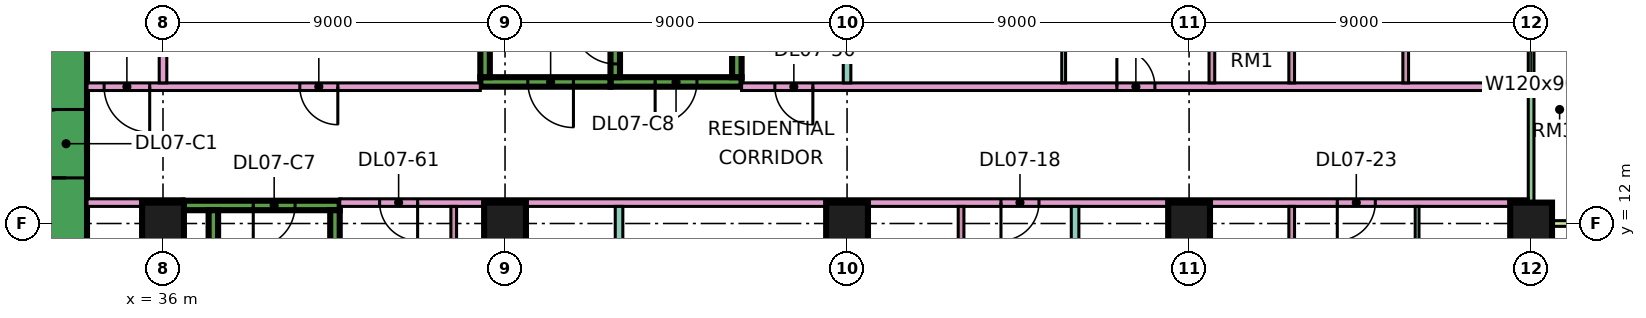
"""IFC4 building model, lengths in metres.
Left out: names, types, materials, properties, quantities, classifications, styles, units other than length and angle.
Written with IfcOpenShell. Run it as: python <this file> out.ifc"""

import sys

from ifc_helpers import new_model, si_unit, direction, frame, frame_2d, origin, origin_2d, place, context, subcontext, project, spatial, rectangle, extrude, element, fill, save


model = new_model("IFC4")
c1 = context("Model", 3, precision=1e-05, world=origin(), true_north=direction((0.0, 1.0)))
c2 = subcontext(c1, "Body", "Model", "MODEL_VIEW")
j1 = project(units=[si_unit("LENGTHUNIT", "METRE"), si_unit("PLANEANGLEUNIT", "RADIAN")], contexts=[c1])
p1 = place(None, origin())
s1 = spatial("IfcSite", under=j1, at=p1, CompositionType="ELEMENT")
p2 = place(p1, origin())
s2 = spatial("IfcBuilding", under=s1, at=p2, CompositionType="ELEMENT")
p3 = place(p2, frame((0.0, 0.0, 41.4)))
s3 = spatial("IfcBuildingStorey", under=s2, at=p3, CompositionType="ELEMENT", Elevation=41.4)
for number, where, z_axis, x_axis in (
    (1, (36.0, 12.0, 0.0), (0.0, 0.0, 1.0), (1.0, 0.0, 0.0)),
    (2, (45.0, 12.0, 0.0), (0.0, 0.0, 1.0), (1.0, 0.0, 0.0)),
    (3, (54.0, 12.0, 0.0), (0.0, 0.0, 1.0), (1.0, 0.0, 0.0)),
    (4, (63.0, 12.0, 0.0), (0.0, 0.0, 1.0), (1.0, 0.0, 0.0)),
    (5, (72.0, 12.0, 0.0), (0.0, 0.0, 1.0), (1.0, 0.0, 0.0)),
):
    element("IfcColumn", number, at=place(p3, frame(where, z_axis=z_axis, x_axis=x_axis)), inside=s3, PredefinedType="COLUMN", context=c2, shape_type="SweptSolid", body=[
        extrude(rectangle(XDim=1.1, YDim=1.1, at=origin_2d()), origin(), (0.0, 0.0, 1.0), 3.75),
    ])
p4 = place(p3, frame((33.45, 8.1, 0.0), z_axis=(0.0, 0.0, 1.0), x_axis=(0.0, 1.0, 0.0)))
e6 = element("IfcWall", 6, at=p4, inside=s3, PredefinedType="SHEAR", context=c2, shape_type="SweptSolid", body=[
    extrude(rectangle(XDim=10.8, YDim=1.1, at=frame_2d((5.4, 0.0))), origin(), (0.0, 0.0, 1.0), 3.75),
])
p5 = place(p4, frame((5.1, 0.0, 0.0)))
e7 = element("IfcOpeningElement", 7, at=p5, cuts=e6, PredefinedType="OPENING", context=c2, shape_type="SweptSolid", body=[
    extrude(rectangle(XDim=1.8, YDim=2.4, at=frame_2d((0.9, 1.2))), frame((0.0, 0.56, 0.0), z_axis=(0.0, -1.0, 0.0), x_axis=(1.0, 0.0, 0.0)), (0.0, 0.0, 1.0), 1.12),
])
p6 = place(p3, frame((36.55, 12.475, 0.0), z_axis=(0.0, 0.0, 1.0), x_axis=(1.0, 0.0, 0.0)))
e8 = element("IfcWall", 8, at=p6, inside=s3, PredefinedType="SHEAR", context=c2, shape_type="SweptSolid", body=[
    extrude(rectangle(XDim=4.1, YDim=0.25, at=frame_2d((2.05, 0.0))), origin(), (0.0, 0.0, 1.0), 3.75),
])
p7 = place(p6, frame((1.825, 0.0, 0.0)))
e9 = element("IfcOpeningElement", 9, at=p7, cuts=e8, PredefinedType="OPENING", context=c2, shape_type="SweptSolid", body=[
    extrude(rectangle(XDim=1.1, YDim=2.2, at=frame_2d((0.55, 1.1))), frame((0.0, 0.135, 0.0), z_axis=(0.0, -1.0, 0.0), x_axis=(1.0, 0.0, 0.0)), (0.0, 0.0, 1.0), 0.27),
])
for number, where, z_axis, x_axis in (
    (10, (37.325, 5.85, 0.0), (0.0, 0.0, 1.0), (0.0, 1.0, 0.0)),
    (11, (40.525, 5.85, 0.0), (0.0, 0.0, 1.0), (0.0, 1.0, 0.0)),
):
    element("IfcWall", number, at=place(p3, frame(where, z_axis=z_axis, x_axis=x_axis)), inside=s3, PredefinedType="SHEAR", context=c2, shape_type="SweptSolid", body=[
        extrude(rectangle(XDim=6.5, YDim=0.25, at=frame_2d((3.25, 0.0))), origin(), (0.0, 0.0, 1.0), 3.75),
    ])
p8 = place(p3, frame((47.775, 15.725, 0.0), z_axis=(0.0, 0.0, 1.0), x_axis=(1.0, 0.0, 0.0)))
e12 = element("IfcWall", 12, at=p8, inside=s3, PredefinedType="SHEAR", context=c2, shape_type="SweptSolid", body=[
    extrude(rectangle(XDim=3.45, YDim=0.25, at=frame_2d((1.725, 0.0))), origin(), (0.0, 0.0, 1.0), 3.75),
])
p9 = place(p8, frame((1.175, 0.0, 0.0)))
e13 = element("IfcOpeningElement", 13, at=p9, cuts=e12, PredefinedType="OPENING", context=c2, shape_type="SweptSolid", body=[
    extrude(rectangle(XDim=1.1, YDim=2.2, at=frame_2d((0.55, 1.1))), frame((0.0, 0.135, 0.0), z_axis=(0.0, -1.0, 0.0), x_axis=(1.0, 0.0, 0.0)), (0.0, 0.0, 1.0), 0.27),
])
p10 = place(p3, frame((47.9, 15.85, 0.0), z_axis=(0.0, 0.0, 1.0), x_axis=(0.0, 1.0, 0.0)))
e14 = element("IfcWall", 14, at=p10, inside=s3, PredefinedType="SHEAR", context=c2, shape_type="SweptSolid", body=[
    extrude(rectangle(XDim=6.5, YDim=0.25, at=frame_2d((3.25, 0.0))), origin(), (0.0, 0.0, 1.0), 3.75),
])
p11 = place(p10, frame((0.35, 0.0, 0.0)))
e15 = element("IfcOpeningElement", 15, at=p11, cuts=e14, PredefinedType="OPENING", context=c2, shape_type="SweptSolid", body=[
    extrude(rectangle(XDim=1.1, YDim=2.2, at=frame_2d((0.55, 1.1))), frame((0.0, 0.135, 0.0), z_axis=(0.0, -1.0, 0.0), x_axis=(1.0, 0.0, 0.0)), (0.0, 0.0, 1.0), 0.27),
])
p12 = place(p3, frame((51.1, 15.85, 0.0), z_axis=(0.0, 0.0, 1.0), x_axis=(0.0, 1.0, 0.0)))
e16 = element("IfcWall", 16, at=p12, inside=s3, PredefinedType="SHEAR", context=c2, shape_type="SweptSolid", body=[
    extrude(rectangle(XDim=6.5, YDim=0.25, at=frame_2d((3.25, 0.0))), origin(), (0.0, 0.0, 1.0), 3.75),
])
p13 = place(p3, frame((44.35, 15.725, 0.0), z_axis=(0.0, 0.0, 1.0), x_axis=(1.0, 0.0, 0.0)))
e17 = element("IfcWall", 17, at=p13, inside=s3, PredefinedType="SHEAR", context=c2, shape_type="SweptSolid", body=[
    extrude(rectangle(XDim=3.425, YDim=0.25, at=frame_2d((1.712, 0.0))), origin(), (0.0, 0.0, 1.0), 3.75),
])
p14 = place(p13, frame((1.25, 0.0, 0.0)))
e18 = element("IfcOpeningElement", 18, at=p14, cuts=e17, PredefinedType="OPENING", context=c2, shape_type="SweptSolid", body=[
    extrude(rectangle(XDim=1.2, YDim=2.2, at=frame_2d((0.6, 1.1))), frame((0.0, 0.135, 0.0), z_axis=(0.0, -1.0, 0.0), x_axis=(1.0, 0.0, 0.0)), (0.0, 0.0, 1.0), 0.27),
])
p15 = place(p3, frame((44.475, 15.85, 0.0), z_axis=(0.0, 0.0, 1.0), x_axis=(0.0, 1.0, 0.0)))
e19 = element("IfcWall", 19, at=p15, inside=s3, PredefinedType="SHEAR", context=c2, shape_type="SweptSolid", body=[
    extrude(rectangle(XDim=6.5, YDim=0.25, at=frame_2d((3.25, 0.0))), origin(), (0.0, 0.0, 1.0), 3.75),
])
p16 = place(p15, frame((1.75, 0.0, 0.0)))
e20 = element("IfcOpeningElement", 20, at=p16, cuts=e19, PredefinedType="OPENING", context=c2, shape_type="SweptSolid", body=[
    extrude(rectangle(XDim=1.1, YDim=2.2, at=frame_2d((0.55, 1.1))), frame((0.0, 0.135, 0.0), z_axis=(0.0, -1.0, 0.0), x_axis=(1.0, 0.0, 0.0)), (0.0, 0.0, 1.0), 0.27),
])
p17 = place(p15, frame((4.3, 0.0, 0.0)))
e21 = element("IfcOpeningElement", 21, at=p17, cuts=e19, PredefinedType="OPENING", context=c2, shape_type="SweptSolid", body=[
    extrude(rectangle(XDim=1.1, YDim=2.2, at=frame_2d((0.55, 1.1))), frame((0.0, 0.135, 0.0), z_axis=(0.0, -1.0, 0.0), x_axis=(1.0, 0.0, 0.0)), (0.0, 0.0, 1.0), 0.27),
])
p18 = place(p3, frame((72.0, 12.075, 0.0), z_axis=(0.0, 0.0, 1.0), x_axis=(0.0, 1.0, 0.0)))
e22 = element("IfcWall", 22, at=p18, inside=s3, PredefinedType="SOLIDWALL", context=c2, shape_type="SweptSolid", body=[
    extrude(rectangle(XDim=10.35, YDim=0.15, at=frame_2d((5.175, 0.0))), origin(), (0.0, 0.0, 1.0), 3.35),
])
p19 = place(p18, frame((4.575, 0.0, 1.7)))
e23 = element("IfcOpeningElement", 23, at=p19, cuts=e22, PredefinedType="OPENING", context=c2, shape_type="SweptSolid", body=[
    extrude(rectangle(XDim=1.2, YDim=0.9, at=frame_2d((0.6, 0.45))), frame((0.0, 0.085, 0.0), z_axis=(0.0, -1.0, 0.0), x_axis=(1.0, 0.0, 0.0)), (0.0, 0.0, 1.0), 0.17),
])
p20 = place(p18, frame((8.587, 0.0, 0.45)))
e24 = element("IfcOpeningElement", 24, at=p20, cuts=e22, PredefinedType="OPENING", context=c2, shape_type="SweptSolid", body=[
    extrude(rectangle(XDim=1.2, YDim=2.4, at=frame_2d((0.6, 1.2))), frame((0.0, 0.085, 0.0), z_axis=(0.0, -1.0, 0.0), x_axis=(1.0, 0.0, 0.0)), (0.0, 0.0, 1.0), 0.17),
])
p21 = place(p3, frame((73.5, 12.0, 0.0), z_axis=(0.0, 0.0, 1.0), x_axis=(-1.0, 0.0, 0.0)))
e25 = element("IfcWall", 25, at=p21, inside=s3, PredefinedType="SOLIDWALL", context=c2, shape_type="SweptSolid", body=[
    extrude(rectangle(XDim=1.5, YDim=0.15, at=frame_2d((0.75, 0.0))), origin(), (0.0, 0.0, 1.0), 3.35),
])
p22 = place(p3, frame((34.0, 12.55, 0.0), z_axis=(0.0, 0.0, 1.0), x_axis=(1.0, 0.0, 0.0)))
e26 = element("IfcWall", 26, at=p22, inside=s3, PredefinedType="PARTITIONING", context=c2, shape_type="SweptSolid", body=[
    extrude(rectangle(XDim=2.551, YDim=0.2, at=frame_2d((1.275, 0.0))), origin(), (0.0, 0.0, 1.0), 3.35),
])
p23 = place(p3, frame((34.0, 15.6, 0.0), z_axis=(0.0, 0.0, 1.0), x_axis=(1.0, 0.0, 0.0)))
e27 = element("IfcWall", 27, at=p23, inside=s3, PredefinedType="PARTITIONING", context=c2, shape_type="SweptSolid", body=[
    extrude(rectangle(XDim=10.35, YDim=0.2, at=frame_2d((5.175, 0.0))), origin(), (0.0, 0.0, 1.0), 3.35),
])
p24 = place(p23, frame((5.6, 0.0, 0.0)))
e28 = element("IfcOpeningElement", 28, at=p24, cuts=e27, PredefinedType="OPENING", context=c2, shape_type="SweptSolid", body=[
    extrude(rectangle(XDim=1.0, YDim=2.1, at=frame_2d((0.5, 1.05))), frame((0.0, 0.11, 0.0), z_axis=(0.0, -1.0, 0.0), x_axis=(1.0, 0.0, 0.0)), (0.0, 0.0, 1.0), 0.22),
])
p25 = place(p23, frame((0.45, 0.0, 0.0)))
e29 = element("IfcOpeningElement", 29, at=p25, cuts=e27, PredefinedType="OPENING", context=c2, shape_type="SweptSolid", body=[
    extrude(rectangle(XDim=1.2, YDim=2.1, at=frame_2d((0.6, 1.05))), frame((0.0, 0.11, 0.0), z_axis=(0.0, -1.0, 0.0), x_axis=(1.0, 0.0, 0.0)), (0.0, 0.0, 1.0), 0.22),
])
p26 = place(p3, frame((36.0, 15.7, 0.0), z_axis=(0.0, 0.0, 1.0), x_axis=(0.0, 1.0, 0.0)))
e30 = element("IfcWall", 30, at=p26, inside=s3, PredefinedType="PARTITIONING", context=c2, shape_type="SweptSolid", body=[
    extrude(rectangle(XDim=8.3, YDim=0.2, at=frame_2d((4.15, 0.0))), origin(), (0.0, 0.0, 1.0), 3.35),
])
p27 = place(p3, frame((40.65, 12.55, 0.0), z_axis=(0.0, 0.0, 1.0), x_axis=(1.0, 0.0, 0.0)))
e31 = element("IfcWall", 31, at=p27, inside=s3, PredefinedType="PARTITIONING", context=c2, shape_type="SweptSolid", body=[
    extrude(rectangle(XDim=31.276, YDim=0.2, at=frame_2d((15.638, 0.0))), origin(), (0.0, 0.0, 1.0), 3.35),
])
p28 = place(p27, frame((17.4, 0.0, 0.0)))
e32 = element("IfcOpeningElement", 32, at=p28, cuts=e31, PredefinedType="OPENING", context=c2, shape_type="SweptSolid", body=[
    extrude(rectangle(XDim=1.0, YDim=2.1, at=frame_2d((0.5, 1.05))), frame((0.0, 0.11, 0.0), z_axis=(0.0, -1.0, 0.0), x_axis=(1.0, 0.0, 0.0)), (0.0, 0.0, 1.0), 0.22),
])
p29 = place(p27, frame((26.25, 0.0, 0.0)))
e33 = element("IfcOpeningElement", 33, at=p29, cuts=e31, PredefinedType="OPENING", context=c2, shape_type="SweptSolid", body=[
    extrude(rectangle(XDim=1.0, YDim=2.1, at=frame_2d((0.5, 1.05))), frame((0.0, 0.11, 0.0), z_axis=(0.0, -1.0, 0.0), x_axis=(1.0, 0.0, 0.0)), (0.0, 0.0, 1.0), 0.22),
])
p30 = place(p27, frame((1.05, 0.0, 0.0)))
e34 = element("IfcOpeningElement", 34, at=p30, cuts=e31, PredefinedType="OPENING", context=c2, shape_type="SweptSolid", body=[
    extrude(rectangle(XDim=1.0, YDim=2.1, at=frame_2d((0.5, 1.05))), frame((0.0, 0.11, 0.0), z_axis=(0.0, -1.0, 0.0), x_axis=(1.0, 0.0, 0.0)), (0.0, 0.0, 1.0), 0.22),
])
p31 = place(p3, frame((43.65, 5.825, 0.0), z_axis=(0.0, 0.0, 1.0), x_axis=(0.0, 1.0, 0.0)))
e35 = element("IfcWall", 35, at=p31, inside=s3, PredefinedType="PARTITIONING", context=c2, shape_type="SweptSolid", body=[
    extrude(rectangle(XDim=6.625, YDim=0.15, at=frame_2d((3.312, 0.0))), origin(), (0.0, 0.0, 1.0), 3.35),
])
p32 = place(p31, frame((4.425, 0.0, 0.0)))
e36 = element("IfcOpeningElement", 36, at=p32, cuts=e35, PredefinedType="OPENING", context=c2, shape_type="SweptSolid", body=[
    extrude(rectangle(XDim=0.9, YDim=2.1, at=frame_2d((0.45, 1.05))), frame((0.0, 0.085, 0.0), z_axis=(0.0, -1.0, 0.0), x_axis=(1.0, 0.0, 0.0)), (0.0, 0.0, 1.0), 0.17),
])
p33 = place(p3, frame((48.0, 0.0, 0.0), z_axis=(0.0, 0.0, 1.0), x_axis=(0.0, 1.0, 0.0)))
e37 = element("IfcWall", 37, at=p33, inside=s3, PredefinedType="PARTITIONING", context=c2, shape_type="SweptSolid", body=[
    extrude(rectangle(XDim=12.45, YDim=0.2, at=frame_2d((6.225, 0.0))), origin(), (0.0, 0.0, 1.0), 3.35),
])
p34 = place(p3, frame((51.225, 15.6, 0.0), z_axis=(0.0, 0.0, 1.0), x_axis=(1.0, 0.0, 0.0)))
e38 = element("IfcWall", 38, at=p34, inside=s3, PredefinedType="PARTITIONING", context=c2, shape_type="SweptSolid", body=[
    extrude(rectangle(XDim=20.701, YDim=0.2, at=frame_2d((10.351, 0.0))), origin(), (0.0, 0.0, 1.0), 3.35),
])
p35 = place(p34, frame((9.875, 0.0, 0.0)))
e39 = element("IfcOpeningElement", 39, at=p35, cuts=e38, PredefinedType="OPENING", context=c2, shape_type="SweptSolid", body=[
    extrude(rectangle(XDim=1.0, YDim=2.1, at=frame_2d((0.5, 1.05))), frame((0.0, 0.11, 0.0), z_axis=(0.0, -1.0, 0.0), x_axis=(1.0, 0.0, 0.0)), (0.0, 0.0, 1.0), 0.22),
])
p36 = place(p34, frame((0.875, 0.0, 0.0)))
e40 = element("IfcOpeningElement", 40, at=p36, cuts=e38, PredefinedType="OPENING", context=c2, shape_type="SweptSolid", body=[
    extrude(rectangle(XDim=1.0, YDim=2.1, at=frame_2d((0.5, 1.05))), frame((0.0, 0.11, 0.0), z_axis=(0.0, -1.0, 0.0), x_axis=(1.0, 0.0, 0.0)), (0.0, 0.0, 1.0), 0.22),
])
p37 = place(p3, frame((54.0, 15.7, 0.0), z_axis=(0.0, 0.0, 1.0), x_axis=(0.0, 1.0, 0.0)))
e41 = element("IfcWall", 41, at=p37, inside=s3, PredefinedType="PARTITIONING", context=c2, shape_type="SweptSolid", body=[
    extrude(rectangle(XDim=8.3, YDim=0.2, at=frame_2d((4.15, 0.0))), origin(), (0.0, 0.0, 1.0), 3.35),
])
p38 = place(p3, frame((54.3, 7.825, 0.0), z_axis=(0.0, 0.0, 1.0), x_axis=(0.0, 1.0, 0.0)))
e42 = element("IfcWall", 42, at=p38, inside=s3, PredefinedType="PARTITIONING", context=c2, shape_type="SweptSolid", body=[
    extrude(rectangle(XDim=4.625, YDim=0.15, at=frame_2d((2.312, 0.0))), origin(), (0.0, 0.0, 1.0), 3.35),
])
p39 = place(p3, frame((57.0, 7.825, 0.0), z_axis=(0.0, 0.0, 1.0), x_axis=(0.0, 1.0, 0.0)))
e43 = element("IfcWall", 43, at=p39, inside=s3, PredefinedType="PARTITIONING", context=c2, shape_type="SweptSolid", body=[
    extrude(rectangle(XDim=4.625, YDim=0.15, at=frame_2d((2.312, 0.0))), origin(), (0.0, 0.0, 1.0), 3.35),
])
p40 = place(p39, frame((1.975, 0.0, 0.0)))
e44 = element("IfcOpeningElement", 44, at=p40, cuts=e43, PredefinedType="OPENING", context=c2, shape_type="SweptSolid", body=[
    extrude(rectangle(XDim=0.8, YDim=2.1, at=frame_2d((0.4, 1.05))), frame((0.0, 0.085, 0.0), z_axis=(0.0, -1.0, 0.0), x_axis=(1.0, 0.0, 0.0)), (0.0, 0.0, 1.0), 0.17),
])
p41 = place(p3, frame((59.7, 15.7, 0.0), z_axis=(0.0, 0.0, 1.0), x_axis=(0.0, 1.0, 0.0)))
e45 = element("IfcWall", 45, at=p41, inside=s3, PredefinedType="PARTITIONING", context=c2, shape_type="SweptSolid", body=[
    extrude(rectangle(XDim=3.15, YDim=0.1, at=frame_2d((1.575, 0.0))), origin(), (0.0, 0.0, 1.0), 3.35),
])
p42 = place(p41, frame((1.1, 0.0, 0.0)))
e46 = element("IfcOpeningElement", 46, at=p42, cuts=e45, PredefinedType="OPENING", context=c2, shape_type="SweptSolid", body=[
    extrude(rectangle(XDim=0.9, YDim=2.1, at=frame_2d((0.45, 1.05))), frame((0.0, 0.06, 0.0), z_axis=(0.0, -1.0, 0.0), x_axis=(1.0, 0.0, 0.0)), (0.0, 0.0, 1.0), 0.12),
])
p43 = place(p3, frame((60.0, 0.0, 0.0), z_axis=(0.0, 0.0, 1.0), x_axis=(0.0, 1.0, 0.0)))
e47 = element("IfcWall", 47, at=p43, inside=s3, PredefinedType="PARTITIONING", context=c2, shape_type="SweptSolid", body=[
    extrude(rectangle(XDim=12.45, YDim=0.2, at=frame_2d((6.225, 0.0))), origin(), (0.0, 0.0, 1.0), 3.35),
])
p44 = place(p3, frame((63.3, 7.225, 0.0), z_axis=(0.0, 0.0, 1.0), x_axis=(0.0, 1.0, 0.0)))
e48 = element("IfcWall", 48, at=p44, inside=s3, PredefinedType="PARTITIONING", context=c2, shape_type="SweptSolid", body=[
    extrude(rectangle(XDim=5.225, YDim=0.15, at=frame_2d((2.612, 0.0))), origin(), (0.0, 0.0, 1.0), 3.35),
])
p45 = place(p3, frame((63.6, 15.7, 0.0), z_axis=(0.0, 0.0, 1.0), x_axis=(0.0, 1.0, 0.0)))
e49 = element("IfcWall", 49, at=p45, inside=s3, PredefinedType="PARTITIONING", context=c2, shape_type="SweptSolid", body=[
    extrude(rectangle(XDim=3.125, YDim=0.15, at=frame_2d((1.562, 0.0))), origin(), (0.0, 0.0, 1.0), 3.35),
])
p46 = place(p45, frame((1.1, 0.0, 0.0)))
e50 = element("IfcOpeningElement", 50, at=p46, cuts=e49, PredefinedType="OPENING", context=c2, shape_type="SweptSolid", body=[
    extrude(rectangle(XDim=0.8, YDim=2.1, at=frame_2d((0.4, 1.05))), frame((0.0, 0.085, 0.0), z_axis=(0.0, -1.0, 0.0), x_axis=(1.0, 0.0, 0.0)), (0.0, 0.0, 1.0), 0.17),
])
p47 = place(p3, frame((65.7, 7.225, 0.0), z_axis=(0.0, 0.0, 1.0), x_axis=(0.0, 1.0, 0.0)))
e51 = element("IfcWall", 51, at=p47, inside=s3, PredefinedType="PARTITIONING", context=c2, shape_type="SweptSolid", body=[
    extrude(rectangle(XDim=5.225, YDim=0.15, at=frame_2d((2.612, 0.0))), origin(), (0.0, 0.0, 1.0), 3.35),
])
p48 = place(p47, frame((2.275, 0.0, 0.0)))
e52 = element("IfcOpeningElement", 52, at=p48, cuts=e51, PredefinedType="OPENING", context=c2, shape_type="SweptSolid", body=[
    extrude(rectangle(XDim=0.8, YDim=2.1, at=frame_2d((0.4, 1.05))), frame((0.0, 0.085, 0.0), z_axis=(0.0, -1.0, 0.0), x_axis=(1.0, 0.0, 0.0)), (0.0, 0.0, 1.0), 0.17),
])
for number, where, z_axis, x_axis in (
    (53, (65.7, 15.7, 0.0), (0.0, 0.0, 1.0), (0.0, 1.0, 0.0)),
    (54, (68.7, 15.7, 0.0), (0.0, 0.0, 1.0), (0.0, 1.0, 0.0)),
):
    element("IfcWall", number, at=place(p3, frame(where, z_axis=z_axis, x_axis=x_axis)), inside=s3, PredefinedType="PARTITIONING", context=c2, shape_type="SweptSolid", body=[
        extrude(rectangle(XDim=3.125, YDim=0.15, at=frame_2d((1.562, 0.0))), origin(), (0.0, 0.0, 1.0), 3.35),
    ])
p49 = place(p3, frame((69.0, 7.1, 0.0), z_axis=(0.0, 0.0, 1.0), x_axis=(0.0, 1.0, 0.0)))
e55 = element("IfcWall", 55, at=p49, inside=s3, PredefinedType="PARTITIONING", context=c2, shape_type="SweptSolid", body=[
    extrude(rectangle(XDim=5.35, YDim=0.1, at=frame_2d((2.675, 0.0))), origin(), (0.0, 0.0, 1.0), 3.35),
])
p50 = place(p5, origin())
e56 = element("IfcDoor", 56, at=p50, inside=s3, OperationType="DOUBLE_DOOR_SINGLE_SWING", PredefinedType="DOOR", context=c2, shape_type="SweptSolid", body=[
    extrude(rectangle(XDim=1.8, YDim=2.4, at=frame_2d((0.9, 1.2))), frame((0.0, 0.025, 0.0), z_axis=(0.0, -1.0, 0.0), x_axis=(1.0, 0.0, 0.0)), (0.0, 0.0, 1.0), 0.05),
])
fill(e7, e56)
p51 = place(p7, frame((1.1, 0.0, 0.0), z_axis=(0.0, 0.0, 1.0), x_axis=(-1.0, 0.0, 0.0)))
e57 = element("IfcDoor", 57, at=p51, inside=s3, OperationType="SINGLE_SWING_LEFT", PredefinedType="DOOR", context=c2, shape_type="SweptSolid", body=[
    extrude(rectangle(XDim=1.1, YDim=2.2, at=frame_2d((0.55, 1.1))), frame((0.0, 0.025, 0.0), z_axis=(0.0, -1.0, 0.0), x_axis=(1.0, 0.0, 0.0)), (0.0, 0.0, 1.0), 0.05),
])
fill(e9, e57)
p52 = place(p9, frame((1.1, 0.0, 0.0), z_axis=(0.0, 0.0, 1.0), x_axis=(-1.0, 0.0, 0.0)))
e58 = element("IfcDoor", 58, at=p52, inside=s3, OperationType="SINGLE_SWING_LEFT", PredefinedType="DOOR", context=c2, shape_type="SweptSolid", body=[
    extrude(rectangle(XDim=1.1, YDim=2.2, at=frame_2d((0.55, 1.1))), frame((0.0, 0.025, 0.0), z_axis=(0.0, -1.0, 0.0), x_axis=(1.0, 0.0, 0.0)), (0.0, 0.0, 1.0), 0.05),
])
fill(e13, e58)
p53 = place(p14, origin())
e59 = element("IfcDoor", 59, at=p53, inside=s3, OperationType="SINGLE_SWING_RIGHT", PredefinedType="DOOR", context=c2, shape_type="SweptSolid", body=[
    extrude(rectangle(XDim=1.2, YDim=2.2, at=frame_2d((0.6, 1.1))), frame((0.0, 0.025, 0.0), z_axis=(0.0, -1.0, 0.0), x_axis=(1.0, 0.0, 0.0)), (0.0, 0.0, 1.0), 0.05),
])
fill(e18, e59)
p54 = place(p11, frame((1.1, 0.0, 0.0), z_axis=(0.0, 0.0, 1.0), x_axis=(-1.0, 0.0, 0.0)))
e60 = element("IfcDoor", 60, at=p54, inside=s3, OperationType="SINGLE_SWING_RIGHT", PredefinedType="DOOR", context=c2, shape_type="SweptSolid", body=[
    extrude(rectangle(XDim=1.1, YDim=2.2, at=frame_2d((0.55, 1.1))), frame((0.0, 0.025, 0.0), z_axis=(0.0, -1.0, 0.0), x_axis=(1.0, 0.0, 0.0)), (0.0, 0.0, 1.0), 0.05),
])
fill(e15, e60)
p55 = place(p24, origin())
e61 = element("IfcDoor", 61, at=p55, inside=s3, OperationType="SINGLE_SWING_RIGHT", PredefinedType="DOOR", context=c2, shape_type="SweptSolid", body=[
    extrude(rectangle(XDim=1.0, YDim=2.1, at=frame_2d((0.5, 1.05))), frame((0.0, 0.025, 0.0), z_axis=(0.0, -1.0, 0.0), x_axis=(1.0, 0.0, 0.0)), (0.0, 0.0, 1.0), 0.05),
])
fill(e28, e61)
p56 = place(p35, origin())
e62 = element("IfcDoor", 62, at=p56, inside=s3, OperationType="SINGLE_SWING_LEFT", PredefinedType="DOOR", context=c2, shape_type="SweptSolid", body=[
    extrude(rectangle(XDim=1.0, YDim=2.1, at=frame_2d((0.5, 1.05))), frame((0.0, 0.025, 0.0), z_axis=(0.0, -1.0, 0.0), x_axis=(1.0, 0.0, 0.0)), (0.0, 0.0, 1.0), 0.05),
])
fill(e39, e62)
p57 = place(p28, frame((1.0, 0.0, 0.0), z_axis=(0.0, 0.0, 1.0), x_axis=(-1.0, 0.0, 0.0)))
e63 = element("IfcDoor", 63, at=p57, inside=s3, OperationType="SINGLE_SWING_LEFT", PredefinedType="DOOR", context=c2, shape_type="SweptSolid", body=[
    extrude(rectangle(XDim=1.0, YDim=2.1, at=frame_2d((0.5, 1.05))), frame((0.0, 0.025, 0.0), z_axis=(0.0, -1.0, 0.0), x_axis=(1.0, 0.0, 0.0)), (0.0, 0.0, 1.0), 0.05),
])
fill(e32, e63)
p58 = place(p29, frame((1.0, 0.0, 0.0), z_axis=(0.0, 0.0, 1.0), x_axis=(-1.0, 0.0, 0.0)))
e64 = element("IfcDoor", 64, at=p58, inside=s3, OperationType="SINGLE_SWING_LEFT", PredefinedType="DOOR", context=c2, shape_type="SweptSolid", body=[
    extrude(rectangle(XDim=1.0, YDim=2.1, at=frame_2d((0.5, 1.05))), frame((0.0, 0.025, 0.0), z_axis=(0.0, -1.0, 0.0), x_axis=(1.0, 0.0, 0.0)), (0.0, 0.0, 1.0), 0.05),
])
fill(e33, e64)
p59 = place(p25, origin())
e65 = element("IfcDoor", 65, at=p59, inside=s3, OperationType="SINGLE_SWING_RIGHT", PredefinedType="DOOR", context=c2, shape_type="SweptSolid", body=[
    extrude(rectangle(XDim=1.2, YDim=2.1, at=frame_2d((0.6, 1.05))), frame((0.0, 0.025, 0.0), z_axis=(0.0, -1.0, 0.0), x_axis=(1.0, 0.0, 0.0)), (0.0, 0.0, 1.0), 0.05),
])
fill(e29, e65)
p60 = place(p36, origin())
e66 = element("IfcDoor", 66, at=p60, inside=s3, OperationType="SINGLE_SWING_RIGHT", PredefinedType="DOOR", context=c2, shape_type="SweptSolid", body=[
    extrude(rectangle(XDim=1.0, YDim=2.1, at=frame_2d((0.5, 1.05))), frame((0.0, 0.025, 0.0), z_axis=(0.0, -1.0, 0.0), x_axis=(1.0, 0.0, 0.0)), (0.0, 0.0, 1.0), 0.05),
])
fill(e40, e66)
p61 = place(p30, origin())
e67 = element("IfcDoor", 67, at=p61, inside=s3, OperationType="SINGLE_SWING_RIGHT", PredefinedType="DOOR", context=c2, shape_type="SweptSolid", body=[
    extrude(rectangle(XDim=1.0, YDim=2.1, at=frame_2d((0.5, 1.05))), frame((0.0, 0.025, 0.0), z_axis=(0.0, -1.0, 0.0), x_axis=(1.0, 0.0, 0.0)), (0.0, 0.0, 1.0), 0.05),
])
fill(e34, e67)
save(model, sys.argv[1])
